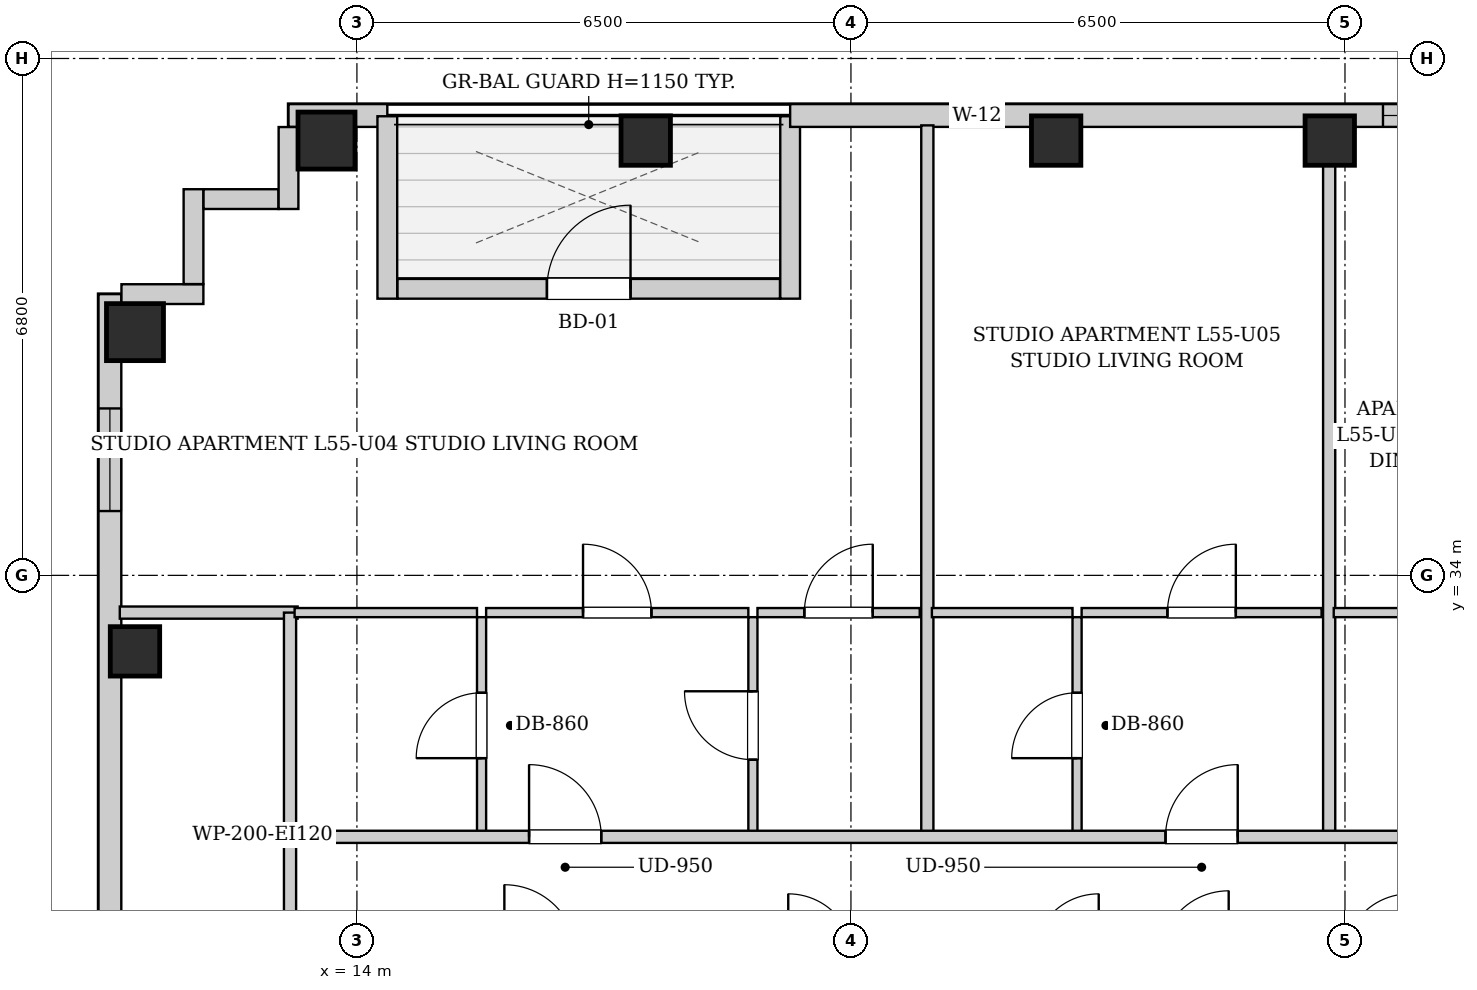
"""IFC4 building model, lengths in metres.
Left out: names, types, materials, properties, quantities, classifications, styles, units other than length and angle.
Written with IfcOpenShell. Run it as: python <this file> out.ifc"""

import sys

from ifc_helpers import new_model, si_unit, direction, frame, frame_2d, origin, origin_2d, place, context, subcontext, project, spatial, rectangle, extrude, element, fill, save


model = new_model("IFC4")
c1 = context("Model", 3, precision=1e-05, world=origin(), true_north=direction((0.0, 1.0)))
c2 = subcontext(c1, "Body", "Model", "MODEL_VIEW")
j1 = project(units=[si_unit("LENGTHUNIT", "METRE"), si_unit("PLANEANGLEUNIT", "RADIAN")], contexts=[c1])
p1 = place(None, origin())
s1 = spatial("IfcSite", under=j1, at=p1, CompositionType="ELEMENT")
p2 = place(p1, origin())
s2 = spatial("IfcBuilding", under=s1, at=p2, CompositionType="ELEMENT")
p3 = place(p2, frame((0.0, 0.0, 190.9)))
s3 = spatial("IfcBuildingStorey", under=s2, at=p3, CompositionType="ELEMENT", Elevation=190.9)
p4 = place(p3, frame((13.6, 39.72, 0.0), z_axis=(0.0, 0.0, 1.0), x_axis=(1.0, 0.0, 0.0)))
e1 = element("IfcColumn", 1, at=p4, inside=s3, PredefinedType="COLUMN", context=c2, shape_type="SweptSolid", body=[
    extrude(rectangle(XDim=0.75, YDim=0.75, at=origin_2d()), origin(), (0.0, 0.0, 1.0), 3.3),
])
for number, where, z_axis, x_axis in (
    (2, (17.8, 39.72, 0.0), (0.0, 0.0, 1.0), (1.0, 0.0, 0.0)),
    (3, (23.2, 39.72, 0.0), (0.0, 0.0, 1.0), (1.0, 0.0, 0.0)),
    (4, (26.8, 39.72, 0.0), (0.0, 0.0, 1.0), (1.0, 0.0, 0.0)),
    (5, (11.08, 33.0, 0.0), (0.0, 0.0, 1.0), (1.0, 0.0, 0.0)),
):
    element("IfcColumn", number, at=place(p3, frame(where, z_axis=z_axis, x_axis=x_axis)), inside=s3, PredefinedType="COLUMN", context=c2, shape_type="SweptSolid", body=[
        extrude(rectangle(XDim=0.65, YDim=0.65, at=origin_2d()), origin(), (0.0, 0.0, 1.0), 3.3),
    ])
p5 = place(p3, frame((11.08, 37.2, 0.0), z_axis=(0.0, 0.0, 1.0), x_axis=(1.0, 0.0, 0.0)))
e6 = element("IfcColumn", 6, at=p5, inside=s3, PredefinedType="COLUMN", context=c2, shape_type="SweptSolid", body=[
    extrude(rectangle(XDim=0.75, YDim=0.75, at=origin_2d()), origin(), (0.0, 0.0, 1.0), 3.3),
])
p6 = place(p3, frame((13.1, 40.05, 0.0), z_axis=(0.0, 0.0, 1.0), x_axis=(1.0, 0.0, 0.0)))
e7 = element("IfcWall", 7, at=p6, inside=s3, PredefinedType="SOLIDWALL", context=c2, shape_type="SweptSolid", body=[
    extrude(rectangle(XDim=1.3, YDim=0.3, at=frame_2d((0.65, 0.0))), origin(), (0.0, 0.0, 1.0), 3.04),
])
p7 = place(p3, frame((14.4, 40.04, 0.0), z_axis=(0.0, 0.0, 1.0), x_axis=(0.0, -1.0, 0.0)))
e8 = element("IfcWall", 8, at=p7, inside=s3, PredefinedType="SOLIDWALL", context=c2, shape_type="SweptSolid", body=[
    extrude(rectangle(XDim=2.4, YDim=0.26, at=frame_2d((1.2, 0.0))), origin(), (0.0, 0.0, 1.0), 3.04),
])
p8 = place(p3, frame((14.534, 37.77, 0.0), z_axis=(0.0, 0.0, 1.0), x_axis=(1.0, 0.0, 0.0)))
e9 = element("IfcWall", 9, at=p8, inside=s3, PredefinedType="SOLIDWALL", context=c2, shape_type="SweptSolid", body=[
    extrude(rectangle(XDim=5.032, YDim=0.26, at=frame_2d((2.516, 0.0))), origin(), (0.0, 0.0, 1.0), 3.04),
])
p9 = place(p8, frame((1.966, 0.0, 0.0)))
e10 = element("IfcOpeningElement", 10, at=p9, cuts=e9, PredefinedType="OPENING", context=c2, shape_type="SweptSolid", body=[
    extrude(rectangle(XDim=1.1, YDim=2.0, at=frame_2d((0.55, 1.0))), frame((0.0, 0.14, 0.0), z_axis=(0.0, -1.0, 0.0), x_axis=(1.0, 0.0, 0.0)), (0.0, 0.0, 1.0), 0.28),
])
p10 = place(p3, frame((19.7, 37.64, 0.0), z_axis=(0.0, 0.0, 1.0), x_axis=(0.0, 1.0, 0.0)))
e11 = element("IfcWall", 11, at=p10, inside=s3, PredefinedType="SOLIDWALL", context=c2, shape_type="SweptSolid", body=[
    extrude(rectangle(XDim=2.4, YDim=0.26, at=frame_2d((1.2, 0.0))), origin(), (0.0, 0.0, 1.0), 3.04),
])
p11 = place(p3, frame((19.7, 40.05, 0.0), z_axis=(0.0, 0.0, 1.0), x_axis=(1.0, 0.0, 0.0)))
e12 = element("IfcWall", 12, at=p11, inside=s3, PredefinedType="SOLIDWALL", context=c2, shape_type="SweptSolid", body=[
    extrude(rectangle(XDim=9.7, YDim=0.3, at=frame_2d((4.85, 0.0))), origin(), (0.0, 0.0, 1.0), 3.04),
])
p12 = place(p11, frame((2.12, 0.0, 0.55)))
e13 = element("IfcOpeningElement", 13, at=p12, cuts=e12, PredefinedType="OPENING", context=c2, shape_type="SweptSolid", body=[
    extrude(rectangle(XDim=0.68, YDim=1.2, at=frame_2d((0.34, 0.6))), frame((0.0, 0.16, 0.0), z_axis=(0.0, -1.0, 0.0), x_axis=(1.0, 0.0, 0.0)), (0.0, 0.0, 1.0), 0.32),
])
p13 = place(p11, frame((7.8, 0.0, 0.55)))
e14 = element("IfcOpeningElement", 14, at=p13, cuts=e12, PredefinedType="OPENING", context=c2, shape_type="SweptSolid", body=[
    extrude(rectangle(XDim=1.35, YDim=1.2, at=frame_2d((0.675, 0.6))), frame((0.0, 0.16, 0.0), z_axis=(0.0, -1.0, 0.0), x_axis=(1.0, 0.0, 0.0)), (0.0, 0.0, 1.0), 0.32),
])
p14 = place(p3, frame((10.75, 6.3, 0.0), z_axis=(0.0, 0.0, 1.0), x_axis=(0.0, 1.0, 0.0)))
e15 = element("IfcWall", 15, at=p14, inside=s3, PredefinedType="SOLIDWALL", context=c2, shape_type="SweptSolid", body=[
    extrude(rectangle(XDim=31.4, YDim=0.3, at=frame_2d((15.7, 0.0))), origin(), (0.0, 0.0, 1.0), 3.04),
])
p15 = place(p14, frame((1.504, 0.0, 0.55)))
e16 = element("IfcOpeningElement", 16, at=p15, cuts=e15, PredefinedType="OPENING", context=c2, shape_type="SweptSolid", body=[
    extrude(rectangle(XDim=1.35, YDim=1.2, at=frame_2d((0.675, 0.6))), frame((0.0, 0.16, 0.0), z_axis=(0.0, -1.0, 0.0), x_axis=(1.0, 0.0, 0.0)), (0.0, 0.0, 1.0), 0.32),
])
p16 = place(p14, frame((28.546, 0.0, 0.55)))
e17 = element("IfcOpeningElement", 17, at=p16, cuts=e15, PredefinedType="OPENING", context=c2, shape_type="SweptSolid", body=[
    extrude(rectangle(XDim=1.35, YDim=1.2, at=frame_2d((0.675, 0.6))), frame((0.0, 0.16, 0.0), z_axis=(0.0, -1.0, 0.0), x_axis=(1.0, 0.0, 0.0)), (0.0, 0.0, 1.0), 0.32),
])
p17 = place(p14, frame((11.85, 0.0, 0.55)))
e18 = element("IfcOpeningElement", 18, at=p17, cuts=e15, PredefinedType="OPENING", context=c2, shape_type="SweptSolid", body=[
    extrude(rectangle(XDim=1.35, YDim=1.2, at=frame_2d((0.675, 0.6))), frame((0.0, 0.16, 0.0), z_axis=(0.0, -1.0, 0.0), x_axis=(1.0, 0.0, 0.0)), (0.0, 0.0, 1.0), 0.32),
])
p18 = place(p14, frame((9.185, 0.0, 0.55)))
e19 = element("IfcOpeningElement", 19, at=p18, cuts=e15, PredefinedType="OPENING", context=c2, shape_type="SweptSolid", body=[
    extrude(rectangle(XDim=1.35, YDim=1.2, at=frame_2d((0.675, 0.6))), frame((0.0, 0.16, 0.0), z_axis=(0.0, -1.0, 0.0), x_axis=(1.0, 0.0, 0.0)), (0.0, 0.0, 1.0), 0.32),
])
p19 = place(p14, frame((19.006, 0.0, 0.55)))
e20 = element("IfcOpeningElement", 20, at=p19, cuts=e15, PredefinedType="OPENING", context=c2, shape_type="SweptSolid", body=[
    extrude(rectangle(XDim=1.35, YDim=1.2, at=frame_2d((0.675, 0.6))), frame((0.0, 0.16, 0.0), z_axis=(0.0, -1.0, 0.0), x_axis=(1.0, 0.0, 0.0)), (0.0, 0.0, 1.0), 0.32),
])
p20 = place(p14, frame((20.616, 0.0, 0.55)))
e21 = element("IfcOpeningElement", 21, at=p20, cuts=e15, PredefinedType="OPENING", context=c2, shape_type="SweptSolid", body=[
    extrude(rectangle(XDim=1.35, YDim=1.2, at=frame_2d((0.675, 0.6))), frame((0.0, 0.16, 0.0), z_axis=(0.0, -1.0, 0.0), x_axis=(1.0, 0.0, 0.0)), (0.0, 0.0, 1.0), 0.32),
])
p21 = place(p3, frame((10.902, 37.7, 0.0), z_axis=(0.0, 0.0, 1.0), x_axis=(1.0, 0.0, 0.0)))
e22 = element("IfcWall", 22, at=p21, inside=s3, PredefinedType="SOLIDWALL", context=c2, shape_type="SweptSolid", body=[
    extrude(rectangle(XDim=1.078, YDim=0.26, at=frame_2d((0.539, 0.0))), origin(), (0.0, 0.0, 1.0), 3.04),
])
p22 = place(p3, frame((11.85, 37.832, 0.0), z_axis=(0.0, 0.0, 1.0), x_axis=(0.0, 1.0, 0.0)))
e23 = element("IfcWall", 23, at=p22, inside=s3, PredefinedType="SOLIDWALL", context=c2, shape_type="SweptSolid", body=[
    extrude(rectangle(XDim=1.248, YDim=0.26, at=frame_2d((0.624, 0.0))), origin(), (0.0, 0.0, 1.0), 3.04),
])
p23 = place(p3, frame((11.982, 38.95, 0.0), z_axis=(0.0, 0.0, 1.0), x_axis=(1.0, 0.0, 0.0)))
e24 = element("IfcWall", 24, at=p23, inside=s3, PredefinedType="SOLIDWALL", context=c2, shape_type="SweptSolid", body=[
    extrude(rectangle(XDim=0.986, YDim=0.26, at=frame_2d((0.493, 0.0))), origin(), (0.0, 0.0, 1.0), 3.04),
])
p24 = place(p3, frame((13.1, 38.82, 0.0), z_axis=(0.0, 0.0, 1.0), x_axis=(0.0, 1.0, 0.0)))
e25 = element("IfcWall", 25, at=p24, inside=s3, PredefinedType="SOLIDWALL", context=c2, shape_type="SweptSolid", body=[
    extrude(rectangle(XDim=1.078, YDim=0.26, at=frame_2d((0.539, 0.0))), origin(), (0.0, 0.0, 1.0), 3.04),
])
p25 = place(p3, frame((13.12, 28.98, 0.0), z_axis=(0.0, 0.0, 1.0), x_axis=(0.0, 1.0, 0.0)))
e26 = element("IfcWall", 26, at=p25, inside=s3, PredefinedType="PARTITIONING", context=c2, shape_type="SweptSolid", body=[
    extrude(rectangle(XDim=1.58, YDim=0.16, at=frame_2d((0.79, 0.0))), origin(), (0.0, 0.0, 1.0), 3.04),
])
p26 = place(p3, frame((10.88, 33.51, 0.0), z_axis=(0.0, 0.0, 1.0), x_axis=(1.0, 0.0, 0.0)))
e27 = element("IfcWall", 27, at=p26, inside=s3, PredefinedType="PARTITIONING", context=c2, shape_type="SweptSolid", body=[
    extrude(rectangle(XDim=2.34, YDim=0.16, at=frame_2d((1.17, 0.0))), origin(), (0.0, 0.0, 1.0), 3.04),
])
p27 = place(p3, frame((13.12, 30.6, 0.0), z_axis=(0.0, 0.0, 1.0), x_axis=(0.0, 1.0, 0.0)))
e28 = element("IfcWall", 28, at=p27, inside=s3, PredefinedType="PARTITIONING", context=c2, shape_type="SweptSolid", body=[
    extrude(rectangle(XDim=2.91, YDim=0.16, at=frame_2d((1.455, 0.0))), origin(), (0.0, 0.0, 1.0), 3.04),
])
p28 = place(p3, frame((15.64, 30.6, 0.0), z_axis=(0.0, 0.0, 1.0), x_axis=(0.0, 1.0, 0.0)))
e29 = element("IfcWall", 29, at=p28, inside=s3, PredefinedType="PARTITIONING", context=c2, shape_type="SweptSolid", body=[
    extrude(rectangle(XDim=2.85, YDim=0.12, at=frame_2d((1.425, 0.0))), origin(), (0.0, 0.0, 1.0), 3.04),
])
p29 = place(p28, frame((0.995, 0.0, 0.0)))
e30 = element("IfcOpeningElement", 30, at=p29, cuts=e29, PredefinedType="OPENING", context=c2, shape_type="SweptSolid", body=[
    extrude(rectangle(XDim=0.86, YDim=2.05, at=frame_2d((0.43, 1.025))), frame((0.0, 0.07, 0.0), z_axis=(0.0, -1.0, 0.0), x_axis=(1.0, 0.0, 0.0)), (0.0, 0.0, 1.0), 0.14),
])
p30 = place(p3, frame((13.18, 33.51, 0.0), z_axis=(0.0, 0.0, 1.0), x_axis=(1.0, 0.0, 0.0)))
e31 = element("IfcWall", 31, at=p30, inside=s3, PredefinedType="PARTITIONING", context=c2, shape_type="SweptSolid", body=[
    extrude(rectangle(XDim=2.4, YDim=0.12, at=frame_2d((1.2, 0.0))), origin(), (0.0, 0.0, 1.0), 3.04),
])
p31 = place(p3, frame((19.21, 30.6, 0.0), z_axis=(0.0, 0.0, 1.0), x_axis=(0.0, 1.0, 0.0)))
e32 = element("IfcWall", 32, at=p31, inside=s3, PredefinedType="PARTITIONING", context=c2, shape_type="SweptSolid", body=[
    extrude(rectangle(XDim=2.85, YDim=0.12, at=frame_2d((1.425, 0.0))), origin(), (0.0, 0.0, 1.0), 3.04),
])
p32 = place(p31, frame((0.975, 0.0, 0.0)))
e33 = element("IfcOpeningElement", 33, at=p32, cuts=e32, PredefinedType="OPENING", context=c2, shape_type="SweptSolid", body=[
    extrude(rectangle(XDim=0.9, YDim=2.05, at=frame_2d((0.45, 1.025))), frame((0.0, 0.07, 0.0), z_axis=(0.0, -1.0, 0.0), x_axis=(1.0, 0.0, 0.0)), (0.0, 0.0, 1.0), 0.14),
])
p33 = place(p3, frame((15.7, 33.51, 0.0), z_axis=(0.0, 0.0, 1.0), x_axis=(1.0, 0.0, 0.0)))
e34 = element("IfcWall", 34, at=p33, inside=s3, PredefinedType="PARTITIONING", context=c2, shape_type="SweptSolid", body=[
    extrude(rectangle(XDim=3.45, YDim=0.12, at=frame_2d((1.725, 0.0))), origin(), (0.0, 0.0, 1.0), 3.04),
])
p34 = place(p33, frame((1.275, 0.0, 0.0)))
e35 = element("IfcOpeningElement", 35, at=p34, cuts=e34, PredefinedType="OPENING", context=c2, shape_type="SweptSolid", body=[
    extrude(rectangle(XDim=0.9, YDim=2.05, at=frame_2d((0.45, 1.025))), frame((0.0, 0.07, 0.0), z_axis=(0.0, -1.0, 0.0), x_axis=(1.0, 0.0, 0.0)), (0.0, 0.0, 1.0), 0.14),
])
p35 = place(p3, frame((19.27, 33.51, 0.0), z_axis=(0.0, 0.0, 1.0), x_axis=(1.0, 0.0, 0.0)))
e36 = element("IfcWall", 36, at=p35, inside=s3, PredefinedType="PARTITIONING", context=c2, shape_type="SweptSolid", body=[
    extrude(rectangle(XDim=2.135, YDim=0.12, at=frame_2d((1.067, 0.0))), origin(), (0.0, 0.0, 1.0), 3.04),
])
p36 = place(p35, frame((0.617, 0.0, 0.0)))
e37 = element("IfcOpeningElement", 37, at=p36, cuts=e36, PredefinedType="OPENING", context=c2, shape_type="SweptSolid", body=[
    extrude(rectangle(XDim=0.9, YDim=2.05, at=frame_2d((0.45, 1.025))), frame((0.0, 0.07, 0.0), z_axis=(0.0, -1.0, 0.0), x_axis=(1.0, 0.0, 0.0)), (0.0, 0.0, 1.0), 0.14),
])
p37 = place(p3, frame((21.505, 30.6, 0.0), z_axis=(0.0, 0.0, 1.0), x_axis=(0.0, 1.0, 0.0)))
e38 = element("IfcWall", 38, at=p37, inside=s3, PredefinedType="PARTITIONING", context=c2, shape_type="SweptSolid", body=[
    extrude(rectangle(XDim=9.32, YDim=0.16, at=frame_2d((4.66, 0.0))), origin(), (0.0, 0.0, 1.0), 3.04),
])
p38 = place(p3, frame((23.475, 30.6, 0.0), z_axis=(0.0, 0.0, 1.0), x_axis=(0.0, 1.0, 0.0)))
e39 = element("IfcWall", 39, at=p38, inside=s3, PredefinedType="PARTITIONING", context=c2, shape_type="SweptSolid", body=[
    extrude(rectangle(XDim=2.85, YDim=0.12, at=frame_2d((1.425, 0.0))), origin(), (0.0, 0.0, 1.0), 3.04),
])
p39 = place(p38, frame((0.995, 0.0, 0.0)))
e40 = element("IfcOpeningElement", 40, at=p39, cuts=e39, PredefinedType="OPENING", context=c2, shape_type="SweptSolid", body=[
    extrude(rectangle(XDim=0.86, YDim=2.05, at=frame_2d((0.43, 1.025))), frame((0.0, 0.07, 0.0), z_axis=(0.0, -1.0, 0.0), x_axis=(1.0, 0.0, 0.0)), (0.0, 0.0, 1.0), 0.14),
])
p40 = place(p3, frame((21.565, 33.51, 0.0), z_axis=(0.0, 0.0, 1.0), x_axis=(1.0, 0.0, 0.0)))
e41 = element("IfcWall", 41, at=p40, inside=s3, PredefinedType="PARTITIONING", context=c2, shape_type="SweptSolid", body=[
    extrude(rectangle(XDim=1.85, YDim=0.12, at=frame_2d((0.925, 0.0))), origin(), (0.0, 0.0, 1.0), 3.04),
])
p41 = place(p3, frame((23.535, 33.51, 0.0), z_axis=(0.0, 0.0, 1.0), x_axis=(1.0, 0.0, 0.0)))
e42 = element("IfcWall", 42, at=p41, inside=s3, PredefinedType="PARTITIONING", context=c2, shape_type="SweptSolid", body=[
    extrude(rectangle(XDim=3.157, YDim=0.12, at=frame_2d((1.579, 0.0))), origin(), (0.0, 0.0, 1.0), 3.04),
])
p42 = place(p41, frame((1.129, 0.0, 0.0)))
e43 = element("IfcOpeningElement", 43, at=p42, cuts=e42, PredefinedType="OPENING", context=c2, shape_type="SweptSolid", body=[
    extrude(rectangle(XDim=0.9, YDim=2.05, at=frame_2d((0.45, 1.025))), frame((0.0, 0.07, 0.0), z_axis=(0.0, -1.0, 0.0), x_axis=(1.0, 0.0, 0.0)), (0.0, 0.0, 1.0), 0.14),
])
p43 = place(p3, frame((26.792, 30.6, 0.0), z_axis=(0.0, 0.0, 1.0), x_axis=(0.0, 1.0, 0.0)))
e44 = element("IfcWall", 44, at=p43, inside=s3, PredefinedType="PARTITIONING", context=c2, shape_type="SweptSolid", body=[
    extrude(rectangle(XDim=9.32, YDim=0.16, at=frame_2d((4.66, 0.0))), origin(), (0.0, 0.0, 1.0), 3.04),
])
p44 = place(p3, frame((26.852, 33.51, 0.0), z_axis=(0.0, 0.0, 1.0), x_axis=(1.0, 0.0, 0.0)))
e45 = element("IfcWall", 45, at=p44, inside=s3, PredefinedType="PARTITIONING", context=c2, shape_type="SweptSolid", body=[
    extrude(rectangle(XDim=2.4, YDim=0.12, at=frame_2d((1.2, 0.0))), origin(), (0.0, 0.0, 1.0), 3.04),
])
p45 = place(p3, frame((13.15, 30.56, 0.0), z_axis=(0.0, 0.0, 1.0), x_axis=(1.0, 0.0, 0.0)))
e46 = element("IfcWall", 46, at=p45, inside=s3, PredefinedType="PARTITIONING", context=c2, shape_type="SweptSolid", body=[
    extrude(rectangle(XDim=24.6, YDim=0.16, at=frame_2d((12.3, 0.0))), origin(), (0.0, 0.0, 1.0), 3.04),
])
p46 = place(p45, frame((3.115, 0.0, 0.0)))
e47 = element("IfcOpeningElement", 47, at=p46, cuts=e46, PredefinedType="OPENING", context=c2, shape_type="SweptSolid", body=[
    extrude(rectangle(XDim=0.95, YDim=2.1, at=frame_2d((0.475, 1.05))), frame((0.0, 0.09, 0.0), z_axis=(0.0, -1.0, 0.0), x_axis=(1.0, 0.0, 0.0)), (0.0, 0.0, 1.0), 0.18),
])
p47 = place(p45, frame((11.489, 0.0, 0.0)))
e48 = element("IfcOpeningElement", 48, at=p47, cuts=e46, PredefinedType="OPENING", context=c2, shape_type="SweptSolid", body=[
    extrude(rectangle(XDim=0.95, YDim=2.1, at=frame_2d((0.475, 1.05))), frame((0.0, 0.09, 0.0), z_axis=(0.0, -1.0, 0.0), x_axis=(1.0, 0.0, 0.0)), (0.0, 0.0, 1.0), 0.18),
])
p48 = place(p45, frame((17.707, 0.0, 0.0)))
e49 = element("IfcOpeningElement", 49, at=p48, cuts=e46, PredefinedType="OPENING", context=c2, shape_type="SweptSolid", body=[
    extrude(rectangle(XDim=0.95, YDim=2.1, at=frame_2d((0.475, 1.05))), frame((0.0, 0.09, 0.0), z_axis=(0.0, -1.0, 0.0), x_axis=(1.0, 0.0, 0.0)), (0.0, 0.0, 1.0), 0.18),
])
p49 = place(p29, origin())
e50 = element("IfcDoor", 50, at=p49, inside=s3, OperationType="SINGLE_SWING_LEFT", PredefinedType="DOOR", context=c2, shape_type="SweptSolid", body=[
    extrude(rectangle(XDim=0.86, YDim=2.05, at=frame_2d((0.43, 1.025))), frame((0.0, 0.025, 0.0), z_axis=(0.0, -1.0, 0.0), x_axis=(1.0, 0.0, 0.0)), (0.0, 0.0, 1.0), 0.05),
])
fill(e30, e50)
p50 = place(p32, origin())
e51 = element("IfcDoor", 51, at=p50, inside=s3, OperationType="SINGLE_SWING_RIGHT", PredefinedType="DOOR", context=c2, shape_type="SweptSolid", body=[
    extrude(rectangle(XDim=0.9, YDim=2.05, at=frame_2d((0.45, 1.025))), frame((0.0, 0.025, 0.0), z_axis=(0.0, -1.0, 0.0), x_axis=(1.0, 0.0, 0.0)), (0.0, 0.0, 1.0), 0.05),
])
fill(e33, e51)
p51 = place(p34, origin())
e52 = element("IfcDoor", 52, at=p51, inside=s3, OperationType="SINGLE_SWING_LEFT", PredefinedType="DOOR", context=c2, shape_type="SweptSolid", body=[
    extrude(rectangle(XDim=0.9, YDim=2.05, at=frame_2d((0.45, 1.025))), frame((0.0, 0.025, 0.0), z_axis=(0.0, -1.0, 0.0), x_axis=(1.0, 0.0, 0.0)), (0.0, 0.0, 1.0), 0.05),
])
fill(e35, e52)
p52 = place(p36, origin())
e53 = element("IfcDoor", 53, at=p52, inside=s3, OperationType="SINGLE_SWING_RIGHT", PredefinedType="DOOR", context=c2, shape_type="SweptSolid", body=[
    extrude(rectangle(XDim=0.9, YDim=2.05, at=frame_2d((0.45, 1.025))), frame((0.0, 0.025, 0.0), z_axis=(0.0, -1.0, 0.0), x_axis=(1.0, 0.0, 0.0)), (0.0, 0.0, 1.0), 0.05),
])
fill(e37, e53)
p53 = place(p39, origin())
e54 = element("IfcDoor", 54, at=p53, inside=s3, OperationType="SINGLE_SWING_LEFT", PredefinedType="DOOR", context=c2, shape_type="SweptSolid", body=[
    extrude(rectangle(XDim=0.86, YDim=2.05, at=frame_2d((0.43, 1.025))), frame((0.0, 0.025, 0.0), z_axis=(0.0, -1.0, 0.0), x_axis=(1.0, 0.0, 0.0)), (0.0, 0.0, 1.0), 0.05),
])
fill(e40, e54)
p54 = place(p42, origin())
e55 = element("IfcDoor", 55, at=p54, inside=s3, OperationType="SINGLE_SWING_RIGHT", PredefinedType="DOOR", context=c2, shape_type="SweptSolid", body=[
    extrude(rectangle(XDim=0.9, YDim=2.05, at=frame_2d((0.45, 1.025))), frame((0.0, 0.025, 0.0), z_axis=(0.0, -1.0, 0.0), x_axis=(1.0, 0.0, 0.0)), (0.0, 0.0, 1.0), 0.05),
])
fill(e43, e55)
p55 = place(p46, origin())
e56 = element("IfcDoor", 56, at=p55, inside=s3, OperationType="SINGLE_SWING_LEFT", PredefinedType="DOOR", context=c2, shape_type="SweptSolid", body=[
    extrude(rectangle(XDim=0.95, YDim=2.1, at=frame_2d((0.475, 1.05))), frame((0.0, 0.025, 0.0), z_axis=(0.0, -1.0, 0.0), x_axis=(1.0, 0.0, 0.0)), (0.0, 0.0, 1.0), 0.05),
])
fill(e47, e56)
p56 = place(p47, origin())
e57 = element("IfcDoor", 57, at=p56, inside=s3, OperationType="SINGLE_SWING_RIGHT", PredefinedType="DOOR", context=c2, shape_type="SweptSolid", body=[
    extrude(rectangle(XDim=0.95, YDim=2.1, at=frame_2d((0.475, 1.05))), frame((0.0, 0.025, 0.0), z_axis=(0.0, -1.0, 0.0), x_axis=(1.0, 0.0, 0.0)), (0.0, 0.0, 1.0), 0.05),
])
fill(e48, e57)
p57 = place(p9, origin())
e58 = element("IfcDoor", 58, at=p57, inside=s3, OperationType="SINGLE_SWING_RIGHT", PredefinedType="DOOR", context=c2, shape_type="SweptSolid", body=[
    extrude(rectangle(XDim=1.1, YDim=2.0, at=frame_2d((0.55, 1.0))), frame((0.0, 0.025, 0.0), z_axis=(0.0, -1.0, 0.0), x_axis=(1.0, 0.0, 0.0)), (0.0, 0.0, 1.0), 0.05),
])
fill(e10, e58)
p58 = place(p16, origin())
e59 = element("IfcWindow", 59, at=p58, inside=s3, PartitioningType="SINGLE_PANEL", PredefinedType="WINDOW", context=c2, shape_type="SweptSolid", body=[
    extrude(rectangle(XDim=1.35, YDim=1.2, at=frame_2d((0.675, 0.6))), frame((0.0, 0.03, 0.0), z_axis=(0.0, -1.0, 0.0), x_axis=(1.0, 0.0, 0.0)), (0.0, 0.0, 1.0), 0.06),
])
fill(e17, e59)
p59 = place(p12, origin())
e60 = element("IfcWindow", 60, at=p59, inside=s3, PartitioningType="SINGLE_PANEL", PredefinedType="WINDOW", context=c2, shape_type="SweptSolid", body=[
    extrude(rectangle(XDim=0.68, YDim=1.2, at=frame_2d((0.34, 0.6))), frame((0.0, 0.03, 0.0), z_axis=(0.0, -1.0, 0.0), x_axis=(1.0, 0.0, 0.0)), (0.0, 0.0, 1.0), 0.06),
])
fill(e13, e60)
p60 = place(p13, origin())
e61 = element("IfcWindow", 61, at=p60, inside=s3, PartitioningType="SINGLE_PANEL", PredefinedType="WINDOW", context=c2, shape_type="SweptSolid", body=[
    extrude(rectangle(XDim=1.35, YDim=1.2, at=frame_2d((0.675, 0.6))), frame((0.0, 0.03, 0.0), z_axis=(0.0, -1.0, 0.0), x_axis=(1.0, 0.0, 0.0)), (0.0, 0.0, 1.0), 0.06),
])
fill(e14, e61)
save(model, sys.argv[1])
